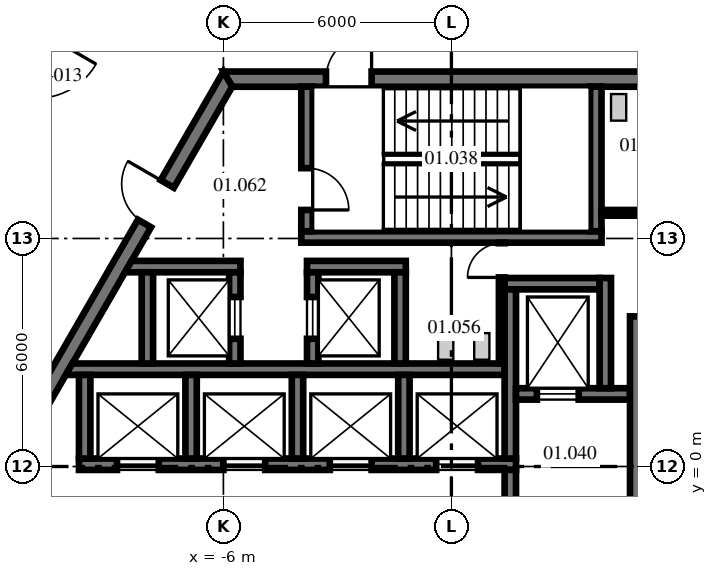
"""IFC4 building model, lengths in metres.
Left out: names, types, materials, properties, quantities, classifications, styles, units other than length and angle.
Written with IfcOpenShell. Run it as: python <this file> out.ifc"""

import sys

from ifc_helpers import new_model, si_unit, direction, frame, frame_2d, origin, place, context, subcontext, project, spatial, polyline, rectangle, outline, extrude, source, transform, mapped, element, fill, save


model = new_model("IFC4")
c1 = context("Model", 3, precision=1e-05, world=origin(), true_north=direction((0.0, 1.0)))
c2 = subcontext(c1, "Body", "Model", "MODEL_VIEW")
j1 = project(units=[si_unit("LENGTHUNIT", "METRE"), si_unit("PLANEANGLEUNIT", "RADIAN")], contexts=[c1])
p1 = place(None, origin())
s1 = spatial("IfcSite", under=j1, at=p1, CompositionType="ELEMENT")
p2 = place(p1, origin())
s2 = spatial("IfcBuilding", under=s1, at=p2, CompositionType="ELEMENT")
p3 = place(p2, frame((0.0, 0.0, 7.0)))
s3 = spatial("IfcBuildingStorey", under=s2, at=p3, CompositionType="ELEMENT", Elevation=7.0)
m1 = source(origin(), c2, "Body", "SweptSolid", [
    extrude(outline(polyline([(-0.115, -0.2), (11.885, -0.2), (11.654, 0.2), (0.115, 0.2), (-0.115, -0.2)])), origin(), (0.0, 0.0, 1.0), 4.3),
])
p4 = place(p3, frame((5.885, 10.192, 0.0), z_axis=(0.0, 0.0, 1.0), x_axis=(-1.0, 0.0, 0.0)))
e1 = element("IfcWall", 1, at=p4, inside=s3, PredefinedType="SHEAR", context=c2, shape_type="MappedRepresentation", body=[
    mapped(m1, transform((0.0, 0.0, 0.0), scale=1.0)),
])
p5 = place(p4, frame((7.985, 0.0, 0.0)))
e2 = element("IfcOpeningElement", 2, at=p5, cuts=e1, PredefinedType="OPENING", context=c2, shape_type="SweptSolid", body=[
    extrude(rectangle(XDim=1.2, YDim=2.1, at=frame_2d((0.6, 1.05))), frame((0.0, 0.21, 0.0), z_axis=(0.0, -1.0, 0.0), x_axis=(1.0, 0.0, 0.0)), (0.0, 0.0, 1.0), 0.42),
])
p6 = place(p3, frame((-5.885, 10.192, 0.0), z_axis=(0.0, 0.0, 1.0), x_axis=(-0.499996592174, -0.866027371285, 0.0)))
e3 = element("IfcWall", 3, at=p6, inside=s3, PredefinedType="SHEAR", context=c2, shape_type="MappedRepresentation", body=[
    mapped(m1, transform((0.0, 0.0, 0.0), scale=1.0)),
])
p7 = place(p6, frame((3.185, 0.0, 0.0)))
e4 = element("IfcOpeningElement", 4, at=p7, cuts=e3, PredefinedType="OPENING", context=c2, shape_type="SweptSolid", body=[
    extrude(rectangle(XDim=1.2, YDim=2.1, at=frame_2d((0.6, 1.05))), frame((0.0, 0.21, 0.0), z_axis=(0.0, -1.0, 0.0), x_axis=(1.0, 0.0, 0.0)), (0.0, 0.0, 1.0), 0.42),
])
p8 = place(p3, frame((-11.769, 0.0, 0.0), z_axis=(0.0, 0.0, 1.0), x_axis=(0.499996592174, -0.866027371285, 0.0)))
e5 = element("IfcWall", 5, at=p8, inside=s3, PredefinedType="SHEAR", context=c2, shape_type="MappedRepresentation", body=[
    mapped(m1, transform((0.0, 0.0, 0.0), scale=1.0)),
])
p9 = place(p8, frame((1.405, 0.0, 0.0)))
e6 = element("IfcOpeningElement", 6, at=p9, cuts=e5, PredefinedType="OPENING", context=c2, shape_type="SweptSolid", body=[
    extrude(rectangle(XDim=1.8, YDim=2.1, at=frame_2d((0.9, 1.05))), frame((0.0, 0.21, 0.0), z_axis=(0.0, -1.0, 0.0), x_axis=(1.0, 0.0, 0.0)), (0.0, 0.0, 1.0), 0.42),
])
p10 = place(p8, frame((7.915, 0.0, 0.0)))
e7 = element("IfcOpeningElement", 7, at=p10, cuts=e5, PredefinedType="OPENING", context=c2, shape_type="SweptSolid", body=[
    extrude(rectangle(XDim=1.2, YDim=2.1, at=frame_2d((0.6, 1.05))), frame((0.0, 0.21, 0.0), z_axis=(0.0, -1.0, 0.0), x_axis=(1.0, 0.0, 0.0)), (0.0, 0.0, 1.0), 0.42),
])
m2 = source(origin(), c2, "Body", "SweptSolid", [
    extrude(rectangle(XDim=11.5, YDim=0.3, at=frame_2d((5.75, 0.0))), origin(), (0.0, 0.0, 1.0), 4.3),
])
p11 = place(p3, frame((-9.8, 0.06, 0.0), z_axis=(0.0, 0.0, 1.0), x_axis=(1.0, 0.0, 0.0)))
e8 = element("IfcWall", 8, at=p11, inside=s3, PredefinedType="SHEAR", context=c2, shape_type="MappedRepresentation", body=[
    mapped(m2, transform((0.0, 0.0, 0.0), scale=1.0)),
])
p12 = place(p11, frame((1.0, 0.0, 0.0)))
e9 = element("IfcOpeningElement", 9, at=p12, cuts=e8, PredefinedType="OPENING", context=c2, shape_type="SweptSolid", body=[
    extrude(rectangle(XDim=1.1, YDim=2.1, at=frame_2d((0.55, 1.05))), frame((0.0, 0.16, 0.0), z_axis=(0.0, -1.0, 0.0), x_axis=(1.0, 0.0, 0.0)), (0.0, 0.0, 1.0), 0.32),
])
p13 = place(p11, frame((3.8, 0.0, 0.0)))
e10 = element("IfcOpeningElement", 10, at=p13, cuts=e8, PredefinedType="OPENING", context=c2, shape_type="SweptSolid", body=[
    extrude(rectangle(XDim=1.1, YDim=2.1, at=frame_2d((0.55, 1.05))), frame((0.0, 0.16, 0.0), z_axis=(0.0, -1.0, 0.0), x_axis=(1.0, 0.0, 0.0)), (0.0, 0.0, 1.0), 0.32),
])
p14 = place(p11, frame((6.6, 0.0, 0.0)))
e11 = element("IfcOpeningElement", 11, at=p14, cuts=e8, PredefinedType="OPENING", context=c2, shape_type="SweptSolid", body=[
    extrude(rectangle(XDim=1.1, YDim=2.1, at=frame_2d((0.55, 1.05))), frame((0.0, 0.16, 0.0), z_axis=(0.0, -1.0, 0.0), x_axis=(1.0, 0.0, 0.0)), (0.0, 0.0, 1.0), 0.32),
])
p15 = place(p11, frame((9.4, 0.0, 0.0)))
e12 = element("IfcOpeningElement", 12, at=p15, cuts=e8, PredefinedType="OPENING", context=c2, shape_type="SweptSolid", body=[
    extrude(rectangle(XDim=1.1, YDim=2.1, at=frame_2d((0.55, 1.05))), frame((0.0, 0.16, 0.0), z_axis=(0.0, -1.0, 0.0), x_axis=(1.0, 0.0, 0.0)), (0.0, 0.0, 1.0), 0.32),
])
m3 = source(origin(), c2, "Body", "SweptSolid", [
    extrude(outline(polyline([(11.2, -0.15), (-0.349, -0.15), (-0.176, 0.15), (11.2, 0.15), (11.2, -0.15)])), origin(), (0.0, 0.0, 1.0), 4.3),
])
p16 = place(p3, frame((-9.8, 2.56, 0.0), z_axis=(0.0, 0.0, 1.0), x_axis=(1.0, 0.0, 0.0)))
e13 = element("IfcWall", 13, at=p16, inside=s3, PredefinedType="SHEAR", context=c2, shape_type="MappedRepresentation", body=[
    mapped(m3, transform((0.0, 0.0, 0.0), scale=1.0)),
])
m4 = source(origin(), c2, "Body", "SweptSolid", [
    extrude(rectangle(XDim=2.5, YDim=0.3, at=frame_2d((1.25, 0.0))), origin(), (0.0, 0.0, 1.0), 4.3),
])
p17 = place(p3, frame((1.4, 4.81, 0.0), z_axis=(0.0, 0.0, 1.0), x_axis=(1.0, 0.0, 0.0)))
e14 = element("IfcWall", 14, at=p17, inside=s3, PredefinedType="SHEAR", context=c2, shape_type="MappedRepresentation", body=[
    mapped(m4, transform((0.0, 0.0, 0.0), scale=1.0)),
])
m5 = source(origin(), c2, "Body", "SweptSolid", [
    extrude(rectangle(XDim=4.45, YDim=0.3, at=frame_2d((2.225, 0.0))), origin(), (0.0, 0.0, 1.0), 4.3),
])
p18 = place(p3, frame((1.55, 0.21, 0.0), z_axis=(0.0, 0.0, 1.0), x_axis=(0.0, 1.0, 0.0)))
e15 = element("IfcWall", 15, at=p18, inside=s3, PredefinedType="SHEAR", context=c2, shape_type="MappedRepresentation", body=[
    mapped(m5, transform((0.0, 0.0, 0.0), scale=1.0)),
])
m6 = source(origin(), c2, "Body", "SweptSolid", [
    extrude(rectangle(XDim=3.0, YDim=0.3, at=frame_2d((1.5, 0.0))), origin(), (0.0, 0.0, 1.0), 4.3),
])
p19 = place(p3, frame((1.7, 1.91, 0.0), z_axis=(0.0, 0.0, 1.0), x_axis=(1.0, 0.0, 0.0)))
e16 = element("IfcWall", 16, at=p19, inside=s3, PredefinedType="SHEAR", context=c2, shape_type="MappedRepresentation", body=[
    mapped(m6, transform((0.0, 0.0, 0.0), scale=1.0)),
])
p20 = place(p19, frame((0.55, 0.0, 0.0)))
e17 = element("IfcOpeningElement", 17, at=p20, cuts=e16, PredefinedType="OPENING", context=c2, shape_type="SweptSolid", body=[
    extrude(rectangle(XDim=1.1, YDim=2.1, at=frame_2d((0.55, 1.05))), frame((0.0, 0.16, 0.0), z_axis=(0.0, -1.0, 0.0), x_axis=(1.0, 0.0, 0.0)), (0.0, 0.0, 1.0), 0.32),
])
m7 = source(origin(), c2, "Body", "SweptSolid", [
    extrude(rectangle(XDim=2.9, YDim=0.3, at=frame_2d((1.45, 0.0))), origin(), (0.0, 0.0, 1.0), 4.3),
])
p21 = place(p3, frame((4.05, 2.06, 0.0), z_axis=(0.0, 0.0, 1.0), x_axis=(0.0, 1.0, 0.0)))
e18 = element("IfcWall", 18, at=p21, inside=s3, PredefinedType="SHEAR", context=c2, shape_type="MappedRepresentation", body=[
    mapped(m7, transform((0.0, 0.0, 0.0), scale=1.0)),
])
m8 = source(origin(), c2, "Body", "SweptSolid", [
    extrude(rectangle(XDim=2.2, YDim=0.3, at=frame_2d((1.1, 0.0))), origin(), (0.0, 0.0, 1.0), 4.3),
])
p22 = place(p3, frame((-9.65, 0.21, 0.0), z_axis=(0.0, 0.0, 1.0), x_axis=(0.0, 1.0, 0.0)))
e19 = element("IfcWall", 19, at=p22, inside=s3, PredefinedType="SHEAR", context=c2, shape_type="MappedRepresentation", body=[
    mapped(m8, transform((0.0, 0.0, 0.0), scale=1.0)),
])
p23 = place(p3, frame((1.55, -3.09, 0.0), z_axis=(0.0, 0.0, 1.0), x_axis=(0.0, 1.0, 0.0)))
e20 = element("IfcWall", 20, at=p23, inside=s3, PredefinedType="SHEAR", context=c2, shape_type="MappedRepresentation", body=[
    mapped(m6, transform((0.0, 0.0, 0.0), scale=1.0)),
])
p24 = place(p23, frame((0.9, 0.0, 0.0)))
e21 = element("IfcOpeningElement", 21, at=p24, cuts=e20, PredefinedType="OPENING", context=c2, shape_type="SweptSolid", body=[
    extrude(rectangle(XDim=1.2, YDim=2.1, at=frame_2d((0.6, 1.05))), frame((0.0, 0.16, 0.0), z_axis=(0.0, -1.0, 0.0), x_axis=(1.0, 0.0, 0.0)), (0.0, 0.0, 1.0), 0.32),
])
m9 = source(origin(), c2, "Body", "SweptSolid", [
    extrude(outline(polyline([(-0.15, -0.15), (9.99, -0.15), (9.99, 0.15), (0.15, 0.15), (-0.15, -0.15)])), origin(), (0.0, 0.0, 1.0), 4.3),
])
p25 = place(p3, frame((4.85, -6.04, 0.0), z_axis=(0.0, 0.0, 1.0), x_axis=(0.0, 1.0, 0.0)))
e22 = element("IfcWall", 22, at=p25, inside=s3, PredefinedType="SHEAR", context=c2, shape_type="MappedRepresentation", body=[
    mapped(m9, transform((0.0, 0.0, 0.0), scale=1.0)),
])
p26 = place(p25, frame((3.19, 0.0, 0.0)))
e23 = element("IfcOpeningElement", 23, at=p26, cuts=e22, PredefinedType="OPENING", context=c2, shape_type="SweptSolid", body=[
    extrude(rectangle(XDim=1.1, YDim=2.1, at=frame_2d((0.55, 1.05))), frame((0.0, 0.16, 0.0), z_axis=(0.0, -1.0, 0.0), x_axis=(1.0, 0.0, 0.0)), (0.0, 0.0, 1.0), 0.32),
])
m10 = source(origin(), c2, "Body", "SweptSolid", [
    extrude(rectangle(XDim=7.9, YDim=0.3, at=frame_2d((3.95, 0.0))), origin(), (0.0, 0.0, 1.0), 4.3),
])
p27 = place(p3, frame((-3.95, 6.04, 0.0), z_axis=(0.0, 0.0, 1.0), x_axis=(1.0, 0.0, 0.0)))
e24 = element("IfcWall", 24, at=p27, inside=s3, PredefinedType="SHEAR", context=c2, shape_type="MappedRepresentation", body=[
    mapped(m10, transform((0.0, 0.0, 0.0), scale=1.0)),
])
m11 = source(origin(), c2, "Body", "SweptSolid", [
    extrude(outline(polyline([(0.0, -0.15), (0.0, 0.15), (3.804, 0.15), (3.804, -0.15), (0.0, -0.15)])), origin(), (0.0, 0.0, 1.0), 4.3),
])
p28 = place(p3, frame((-3.8, 6.19, 0.0), z_axis=(0.0, 0.0, 1.0), x_axis=(0.0, 1.0, 0.0)))
e25 = element("IfcWall", 25, at=p28, inside=s3, PredefinedType="SHEAR", context=c2, shape_type="MappedRepresentation", body=[
    mapped(m11, transform((0.0, 0.0, 0.0), scale=1.0)),
])
p29 = place(p28, frame((0.56, 0.0, 0.0)))
e26 = element("IfcOpeningElement", 26, at=p29, cuts=e25, PredefinedType="OPENING", context=c2, shape_type="SweptSolid", body=[
    extrude(rectangle(XDim=1.1, YDim=2.1, at=frame_2d((0.55, 1.05))), frame((0.0, 0.16, 0.0), z_axis=(0.0, -1.0, 0.0), x_axis=(1.0, 0.0, 0.0)), (0.0, 0.0, 1.0), 0.32),
])
p30 = place(p3, frame((3.8, 6.19, 0.0), z_axis=(0.0, 0.0, 1.0), x_axis=(0.0, 1.0, 0.0)))
e27 = element("IfcWall", 27, at=p30, inside=s3, PredefinedType="SHEAR", context=c2, shape_type="MappedRepresentation", body=[
    mapped(m11, transform((0.0, 0.0, 0.0), scale=1.0)),
])
m12 = source(origin(), c2, "Body", "SweptSolid", [
    extrude(outline(polyline([(2.6, -0.15), (-0.44, -0.15), (-0.267, 0.15), (2.6, 0.15), (2.6, -0.15)])), origin(), (0.0, 0.0, 1.0), 4.3),
])
p31 = place(p3, frame((-8.15, 5.26, 0.0), z_axis=(0.0, 0.0, 1.0), x_axis=(1.0, 0.0, 0.0)))
e28 = element("IfcWall", 28, at=p31, inside=s3, PredefinedType="SHEAR", context=c2, shape_type="MappedRepresentation", body=[
    mapped(m12, transform((0.0, 0.0, 0.0), scale=1.0)),
])
m13 = source(origin(), c2, "Body", "SweptSolid", [
    extrude(rectangle(XDim=2.4, YDim=0.3, at=frame_2d((1.2, 0.0))), origin(), (0.0, 0.0, 1.0), 4.3),
])
p32 = place(p3, frame((-8.0, 2.71, 0.0), z_axis=(0.0, 0.0, 1.0), x_axis=(0.0, 1.0, 0.0)))
e29 = element("IfcWall", 29, at=p32, inside=s3, PredefinedType="SHEAR", context=c2, shape_type="MappedRepresentation", body=[
    mapped(m13, transform((0.0, 0.0, 0.0), scale=1.0)),
])
p33 = place(p3, frame((-5.7, 2.71, 0.0), z_axis=(0.0, 0.0, 1.0), x_axis=(0.0, 1.0, 0.0)))
e30 = element("IfcWall", 30, at=p33, inside=s3, PredefinedType="SHEAR", context=c2, shape_type="MappedRepresentation", body=[
    mapped(m13, transform((0.0, 0.0, 0.0), scale=1.0)),
])
p34 = place(p33, frame((0.65, 0.0, 0.0)))
e31 = element("IfcOpeningElement", 31, at=p34, cuts=e30, PredefinedType="OPENING", context=c2, shape_type="SweptSolid", body=[
    extrude(rectangle(XDim=1.1, YDim=2.1, at=frame_2d((0.55, 1.05))), frame((0.0, 0.16, 0.0), z_axis=(0.0, -1.0, 0.0), x_axis=(1.0, 0.0, 0.0)), (0.0, 0.0, 1.0), 0.32),
])
m14 = source(origin(), c2, "Body", "SweptSolid", [
    extrude(rectangle(XDim=2.6, YDim=0.3, at=frame_2d((1.3, 0.0))), origin(), (0.0, 0.0, 1.0), 4.3),
])
p35 = place(p3, frame((-3.8, 5.26, 0.0), z_axis=(0.0, 0.0, 1.0), x_axis=(1.0, 0.0, 0.0)))
e32 = element("IfcWall", 32, at=p35, inside=s3, PredefinedType="SHEAR", context=c2, shape_type="MappedRepresentation", body=[
    mapped(m14, transform((0.0, 0.0, 0.0), scale=1.0)),
])
p36 = place(p3, frame((-3.65, 2.71, 0.0), z_axis=(0.0, 0.0, 1.0), x_axis=(0.0, 1.0, 0.0)))
e33 = element("IfcWall", 33, at=p36, inside=s3, PredefinedType="SHEAR", context=c2, shape_type="MappedRepresentation", body=[
    mapped(m13, transform((0.0, 0.0, 0.0), scale=1.0)),
])
p37 = place(p36, frame((0.65, 0.0, 0.0)))
e34 = element("IfcOpeningElement", 34, at=p37, cuts=e33, PredefinedType="OPENING", context=c2, shape_type="SweptSolid", body=[
    extrude(rectangle(XDim=1.1, YDim=2.1, at=frame_2d((0.55, 1.05))), frame((0.0, 0.16, 0.0), z_axis=(0.0, -1.0, 0.0), x_axis=(1.0, 0.0, 0.0)), (0.0, 0.0, 1.0), 0.32),
])
p38 = place(p3, frame((-1.35, 2.71, 0.0), z_axis=(0.0, 0.0, 1.0), x_axis=(0.0, 1.0, 0.0)))
e35 = element("IfcWall", 35, at=p38, inside=s3, PredefinedType="SHEAR", context=c2, shape_type="MappedRepresentation", body=[
    mapped(m13, transform((0.0, 0.0, 0.0), scale=1.0)),
])
m15 = source(origin(), c2, "Body", "SweptSolid", [
    extrude(rectangle(XDim=3.18, YDim=0.15, at=frame_2d((1.59, 0.0))), origin(), (0.0, 0.0, 1.0), 4.3),
])
p39 = place(p3, frame((1.325, 2.71, 0.0), z_axis=(0.0, 0.0, 1.0), x_axis=(0.0, 1.0, 0.0)))
e36 = element("IfcWall", 36, at=p39, inside=s3, PredefinedType="PARTITIONING", context=c2, shape_type="MappedRepresentation", body=[
    mapped(m15, transform((0.0, 0.0, 0.0), scale=1.0)),
])
p40 = place(p39, frame((2.265, 0.0, 0.0)))
e37 = element("IfcOpeningElement", 37, at=p40, cuts=e36, PredefinedType="OPENING", context=c2, shape_type="SweptSolid", body=[
    extrude(rectangle(XDim=0.9, YDim=2.1, at=frame_2d((0.45, 1.05))), frame((0.0, 0.085, 0.0), z_axis=(0.0, -1.0, 0.0), x_axis=(1.0, 0.0, 0.0)), (0.0, 0.0, 1.0), 0.17),
])
m16 = source(origin(), c2, "Body", "SweptSolid", [
    extrude(outline(polyline([(0.0, -0.075), (0.0, 0.075), (3.693, 0.075), (3.78, -0.075), (0.0, -0.075)])), origin(), (0.0, 0.0, 1.0), 4.3),
])
p41 = place(p3, frame((3.95, 6.675, 0.0), z_axis=(0.0, 0.0, 1.0), x_axis=(1.0, 0.0, 0.0)))
e38 = element("IfcWall", 38, at=p41, inside=s3, PredefinedType="PARTITIONING", context=c2, shape_type="MappedRepresentation", body=[
    mapped(m16, transform((0.0, 0.0, 0.0), scale=1.0)),
])
p42 = place(p41, frame((1.6, 0.0, 0.0)))
e39 = element("IfcOpeningElement", 39, at=p42, cuts=e38, PredefinedType="OPENING", context=c2, shape_type="SweptSolid", body=[
    extrude(rectangle(XDim=0.9, YDim=2.1, at=frame_2d((0.45, 1.05))), frame((0.0, 0.085, 0.0), z_axis=(0.0, -1.0, 0.0), x_axis=(1.0, 0.0, 0.0)), (0.0, 0.0, 1.0), 0.17),
])
for number, where, z_axis, x_axis in (
    (40, (-6.85, 0.21, 0.0), (0.0, 0.0, 1.0), (0.0, 1.0, 0.0)),
    (41, (-4.05, 0.21, 0.0), (0.0, 0.0, 1.0), (0.0, 1.0, 0.0)),
    (42, (-1.25, 0.21, 0.0), (0.0, 0.0, 1.0), (0.0, 1.0, 0.0)),
):
    element("IfcWall", number, at=place(p3, frame(where, z_axis=z_axis, x_axis=x_axis)), inside=s3, PredefinedType="SHEAR", context=c2, shape_type="MappedRepresentation", body=[
        mapped(m8, transform((0.0, 0.0, 0.0), scale=1.0)),
    ])
p43 = place(p3, frame((-17.542, 0.0, 0.0), z_axis=(0.0, 0.0, 1.0), x_axis=(0.499996320153, -0.866027528335, 0.0)))
e43 = element("IfcWall", 43, at=p43, inside=s3, PredefinedType="PARTITIONING", context=c2, shape_type="SweptSolid", body=[
    extrude(rectangle(XDim=17.543, YDim=0.15, at=frame_2d((8.771, 0.0))), origin(), (0.0, 0.0, 1.0), 4.3),
])
p44 = place(p43, frame((3.65, 0.0, 0.0)))
e44 = element("IfcOpeningElement", 44, at=p44, cuts=e43, PredefinedType="OPENING", context=c2, shape_type="SweptSolid", body=[
    extrude(rectangle(XDim=0.9, YDim=2.1, at=frame_2d((0.45, 1.05))), frame((0.0, 0.085, 0.0), z_axis=(0.0, -1.0, 0.0), x_axis=(1.0, 0.0, 0.0)), (0.0, 0.0, 1.0), 0.17),
])
p45 = place(p43, frame((12.43, 0.0, 0.0)))
e45 = element("IfcOpeningElement", 45, at=p45, cuts=e43, PredefinedType="OPENING", context=c2, shape_type="SweptSolid", body=[
    extrude(rectangle(XDim=0.9, YDim=2.1, at=frame_2d((0.45, 1.05))), frame((0.0, 0.085, 0.0), z_axis=(0.0, -1.0, 0.0), x_axis=(1.0, 0.0, 0.0)), (0.0, 0.0, 1.0), 0.17),
])
p46 = place(p3, frame((-17.518, 0.044, 0.0), z_axis=(0.0, 0.0, 1.0), x_axis=(0.500011872673, 0.866018548985, 0.0)))
e46 = element("IfcWall", 46, at=p46, inside=s3, PredefinedType="PARTITIONING", context=c2, shape_type="SweptSolid", body=[
    extrude(rectangle(XDim=17.452, YDim=0.15, at=frame_2d((8.726, 0.0))), origin(), (0.0, 0.0, 1.0), 4.3),
])
p47 = place(p46, frame((11.417, 0.0, 0.0)))
e47 = element("IfcOpeningElement", 47, at=p47, cuts=e46, PredefinedType="OPENING", context=c2, shape_type="SweptSolid", body=[
    extrude(rectangle(XDim=1.8, YDim=2.4, at=frame_2d((0.9, 1.2))), frame((0.0, 0.085, 0.0), z_axis=(0.0, -1.0, 0.0), x_axis=(1.0, 0.0, 0.0)), (0.0, 0.0, 1.0), 0.17),
])
p48 = place(p46, frame((2.006, 0.0, 0.0)))
e48 = element("IfcOpeningElement", 48, at=p48, cuts=e46, PredefinedType="OPENING", context=c2, shape_type="SweptSolid", body=[
    extrude(rectangle(XDim=0.9, YDim=2.1, at=frame_2d((0.45, 1.05))), frame((0.0, 0.085, 0.0), z_axis=(0.0, -1.0, 0.0), x_axis=(1.0, 0.0, 0.0)), (0.0, 0.0, 1.0), 0.17),
])
p49 = place(p46, frame((6.108, 0.0, 0.0)))
e49 = element("IfcOpeningElement", 49, at=p49, cuts=e46, PredefinedType="OPENING", context=c2, shape_type="SweptSolid", body=[
    extrude(rectangle(XDim=0.9, YDim=2.1, at=frame_2d((0.45, 1.05))), frame((0.0, 0.085, 0.0), z_axis=(0.0, -1.0, 0.0), x_axis=(1.0, 0.0, 0.0)), (0.0, 0.0, 1.0), 0.17),
])
p50 = place(p5, frame((1.2, 0.0, 0.0), z_axis=(0.0, 0.0, 1.0), x_axis=(-1.0, 0.0, 0.0)))
e50 = element("IfcDoor", 50, at=p50, inside=s3, OperationType="SINGLE_SWING_RIGHT", PredefinedType="DOOR", context=c2, shape_type="SweptSolid", body=[
    extrude(rectangle(XDim=1.2, YDim=2.1, at=frame_2d((0.6, 1.05))), frame((0.0, 0.025, 0.0), z_axis=(0.0, -1.0, 0.0), x_axis=(1.0, 0.0, 0.0)), (0.0, 0.0, 1.0), 0.05),
])
fill(e2, e50)
p51 = place(p7, frame((1.2, 0.0, 0.0), z_axis=(0.0, 0.0, 1.0), x_axis=(-1.0, 0.0, 0.0)))
e51 = element("IfcDoor", 51, at=p51, inside=s3, OperationType="SINGLE_SWING_RIGHT", PredefinedType="DOOR", context=c2, shape_type="SweptSolid", body=[
    extrude(rectangle(XDim=1.2, YDim=2.1, at=frame_2d((0.6, 1.05))), frame((0.0, 0.025, 0.0), z_axis=(0.0, -1.0, 0.0), x_axis=(1.0, 0.0, 0.0)), (0.0, 0.0, 1.0), 0.05),
])
fill(e4, e51)
p52 = place(p29, frame((1.1, 0.0, 0.0), z_axis=(0.0, 0.0, 1.0), x_axis=(-1.0, 0.0, 0.0)))
e52 = element("IfcDoor", 52, at=p52, inside=s3, OperationType="SINGLE_SWING_RIGHT", PredefinedType="DOOR", context=c2, shape_type="SweptSolid", body=[
    extrude(rectangle(XDim=1.1, YDim=2.1, at=frame_2d((0.55, 1.05))), frame((0.0, 0.025, 0.0), z_axis=(0.0, -1.0, 0.0), x_axis=(1.0, 0.0, 0.0)), (0.0, 0.0, 1.0), 0.05),
])
fill(e26, e52)
p53 = place(p40, origin())
e53 = element("IfcDoor", 53, at=p53, inside=s3, OperationType="SINGLE_SWING_LEFT", PredefinedType="DOOR", context=c2, shape_type="SweptSolid", body=[
    extrude(rectangle(XDim=0.9, YDim=2.1, at=frame_2d((0.45, 1.05))), frame((0.0, 0.025, 0.0), z_axis=(0.0, -1.0, 0.0), x_axis=(1.0, 0.0, 0.0)), (0.0, 0.0, 1.0), 0.05),
])
fill(e37, e53)
p54 = place(p12, origin())
e54 = element("IfcDoor", 54, at=p54, inside=s3, OperationType="DOUBLE_DOOR_SLIDING", PredefinedType="DOOR", context=c2, shape_type="SweptSolid", body=[
    extrude(rectangle(XDim=1.1, YDim=2.1, at=frame_2d((0.55, 1.05))), frame((0.0, 0.025, 0.0), z_axis=(0.0, -1.0, 0.0), x_axis=(1.0, 0.0, 0.0)), (0.0, 0.0, 1.0), 0.05),
])
fill(e9, e54)
p55 = place(p13, origin())
e55 = element("IfcDoor", 55, at=p55, inside=s3, OperationType="DOUBLE_DOOR_SLIDING", PredefinedType="DOOR", context=c2, shape_type="SweptSolid", body=[
    extrude(rectangle(XDim=1.1, YDim=2.1, at=frame_2d((0.55, 1.05))), frame((0.0, 0.025, 0.0), z_axis=(0.0, -1.0, 0.0), x_axis=(1.0, 0.0, 0.0)), (0.0, 0.0, 1.0), 0.05),
])
fill(e10, e55)
p56 = place(p14, origin())
e56 = element("IfcDoor", 56, at=p56, inside=s3, OperationType="DOUBLE_DOOR_SLIDING", PredefinedType="DOOR", context=c2, shape_type="SweptSolid", body=[
    extrude(rectangle(XDim=1.1, YDim=2.1, at=frame_2d((0.55, 1.05))), frame((0.0, 0.025, 0.0), z_axis=(0.0, -1.0, 0.0), x_axis=(1.0, 0.0, 0.0)), (0.0, 0.0, 1.0), 0.05),
])
fill(e11, e56)
p57 = place(p15, origin())
e57 = element("IfcDoor", 57, at=p57, inside=s3, OperationType="DOUBLE_DOOR_SLIDING", PredefinedType="DOOR", context=c2, shape_type="SweptSolid", body=[
    extrude(rectangle(XDim=1.1, YDim=2.1, at=frame_2d((0.55, 1.05))), frame((0.0, 0.025, 0.0), z_axis=(0.0, -1.0, 0.0), x_axis=(1.0, 0.0, 0.0)), (0.0, 0.0, 1.0), 0.05),
])
fill(e12, e57)
p58 = place(p20, origin())
e58 = element("IfcDoor", 58, at=p58, inside=s3, OperationType="DOUBLE_DOOR_SLIDING", PredefinedType="DOOR", context=c2, shape_type="SweptSolid", body=[
    extrude(rectangle(XDim=1.1, YDim=2.1, at=frame_2d((0.55, 1.05))), frame((0.0, 0.025, 0.0), z_axis=(0.0, -1.0, 0.0), x_axis=(1.0, 0.0, 0.0)), (0.0, 0.0, 1.0), 0.05),
])
fill(e17, e58)
p59 = place(p34, origin())
e59 = element("IfcDoor", 59, at=p59, inside=s3, OperationType="DOUBLE_DOOR_SLIDING", PredefinedType="DOOR", context=c2, shape_type="SweptSolid", body=[
    extrude(rectangle(XDim=1.1, YDim=2.1, at=frame_2d((0.55, 1.05))), frame((0.0, 0.025, 0.0), z_axis=(0.0, -1.0, 0.0), x_axis=(1.0, 0.0, 0.0)), (0.0, 0.0, 1.0), 0.05),
])
fill(e31, e59)
p60 = place(p37, origin())
e60 = element("IfcDoor", 60, at=p60, inside=s3, OperationType="DOUBLE_DOOR_SLIDING", PredefinedType="DOOR", context=c2, shape_type="SweptSolid", body=[
    extrude(rectangle(XDim=1.1, YDim=2.1, at=frame_2d((0.55, 1.05))), frame((0.0, 0.025, 0.0), z_axis=(0.0, -1.0, 0.0), x_axis=(1.0, 0.0, 0.0)), (0.0, 0.0, 1.0), 0.05),
])
fill(e34, e60)
save(model, sys.argv[1])
